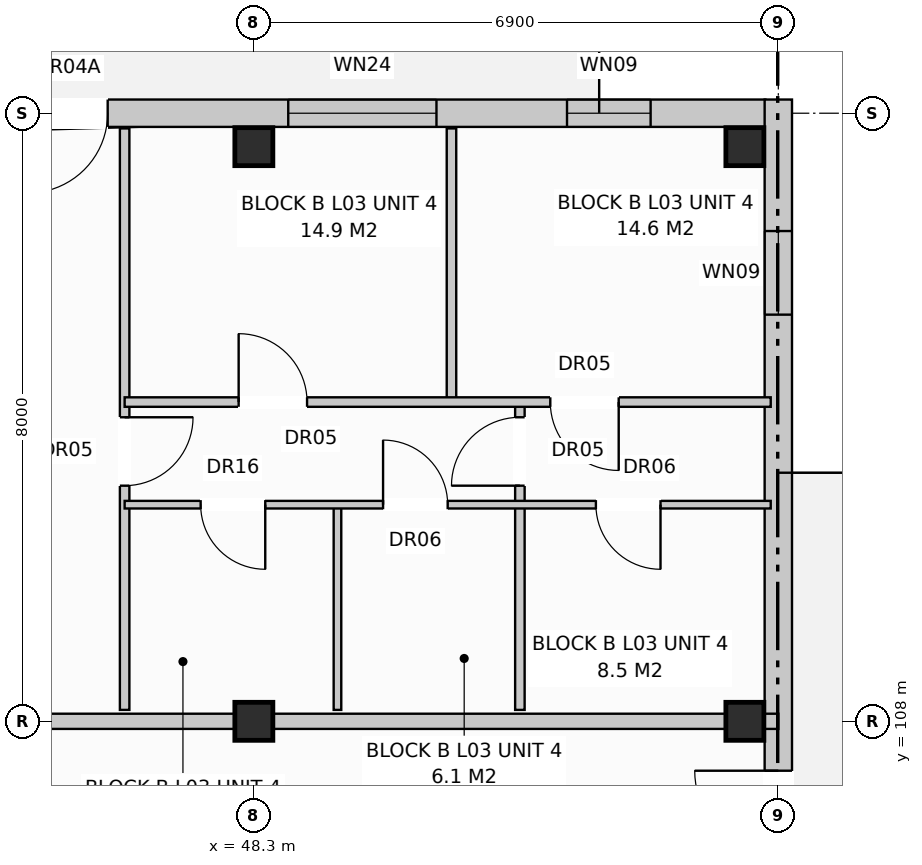
"""IFC4 building model, lengths in metres.
Left out: names, types, materials, properties, quantities, classifications, styles, units other than length and angle.
Written with IfcOpenShell. Run it as: python <this file> out.ifc"""

import sys

from ifc_helpers import new_model, si_unit, direction, frame, frame_2d, origin, origin_with_axes, origin_2d, place, context, subcontext, project, spatial, rectangle, extrude, element, fill, save


model = new_model("IFC4")
c1 = context("Model", 3, precision=1e-05, world=origin(), true_north=direction((0.0, 1.0)))
c2 = subcontext(c1, "Body", "Model", "MODEL_VIEW")
j1 = project(units=[si_unit("LENGTHUNIT", "METRE"), si_unit("PLANEANGLEUNIT", "RADIAN")], contexts=[c1])
p1 = place(None, origin())
s1 = spatial("IfcSite", under=j1, at=p1, CompositionType="ELEMENT")
p2 = place(p1, origin())
s2 = spatial("IfcBuilding", under=s1, at=p2, CompositionType="ELEMENT")
p3 = place(p2, frame((0.0, 0.0, 11.2)))
s3 = spatial("IfcBuildingStorey", under=s2, at=p3, CompositionType="ELEMENT", Elevation=11.2)
for number, where, z_axis, x_axis in (
    (1, (48.3, 108.0, 0.0), (0.0, 0.0, 1.0), (1.0, 0.0, 0.0)),
    (2, (48.3, 115.56, 0.0), (0.0, 0.0, 1.0), (1.0, 0.0, 0.0)),
    (3, (54.76, 108.0, 0.0), (0.0, 0.0, 1.0), (1.0, 0.0, 0.0)),
    (4, (54.76, 115.56, 0.0), (0.0, 0.0, 1.0), (1.0, 0.0, 0.0)),
):
    element("IfcColumn", number, at=place(p3, frame(where, z_axis=z_axis, x_axis=x_axis)), inside=s3, PredefinedType="COLUMN", context=c2, shape_type="SweptSolid", body=[
        extrude(rectangle(XDim=0.5, YDim=0.5, at=origin_2d()), origin(), (0.0, 0.0, 1.0), 3.2),
    ])
p4 = place(p3, frame((0.17, 116.0, 0.0), z_axis=(0.0, 0.0, 1.0), x_axis=(1.0, 0.0, 0.0)))
e5 = element("IfcWall", 5, at=p4, inside=s3, PredefinedType="STANDARD", context=c2, shape_type="SweptSolid", body=[
    extrude(rectangle(XDim=54.86, YDim=0.36, at=frame_2d((27.43, 0.0))), origin(), (0.0, 0.0, 1.0), 2.94),
])
p5 = place(p4, frame((2.777, 0.0, 0.0)))
e6 = element("IfcOpeningElement", 6, at=p5, cuts=e5, PredefinedType="OPENING", context=c2, shape_type="SweptSolid", body=[
    extrude(rectangle(XDim=1.05, YDim=2.12, at=frame_2d((0.525, 1.06))), frame((0.0, 0.192, 0.0), z_axis=(0.0, -1.0, 0.0), x_axis=(1.0, 0.0, 0.0)), (0.0, 0.0, 1.0), 0.384),
])
p6 = place(p4, frame((16.277, 0.0, 0.0)))
e7 = element("IfcOpeningElement", 7, at=p6, cuts=e5, PredefinedType="OPENING", context=c2, shape_type="SweptSolid", body=[
    extrude(rectangle(XDim=1.05, YDim=2.12, at=frame_2d((0.525, 1.06))), frame((0.0, 0.192, 0.0), z_axis=(0.0, -1.0, 0.0), x_axis=(1.0, 0.0, 0.0)), (0.0, 0.0, 1.0), 0.384),
])
p7 = place(p4, frame((30.777, 0.0, 0.0)))
e8 = element("IfcOpeningElement", 8, at=p7, cuts=e5, PredefinedType="OPENING", context=c2, shape_type="SweptSolid", body=[
    extrude(rectangle(XDim=1.05, YDim=2.12, at=frame_2d((0.525, 1.06))), frame((0.0, 0.192, 0.0), z_axis=(0.0, -1.0, 0.0), x_axis=(1.0, 0.0, 0.0)), (0.0, 0.0, 1.0), 0.384),
])
p8 = place(p4, frame((45.157, 0.0, 0.0)))
e9 = element("IfcOpeningElement", 9, at=p8, cuts=e5, PredefinedType="OPENING", context=c2, shape_type="SweptSolid", body=[
    extrude(rectangle(XDim=1.05, YDim=2.12, at=frame_2d((0.525, 1.06))), frame((0.0, 0.192, 0.0), z_axis=(0.0, -1.0, 0.0), x_axis=(1.0, 0.0, 0.0)), (0.0, 0.0, 1.0), 0.384),
])
p9 = place(p4, frame((1.05, 0.0, 0.72)))
e10 = element("IfcOpeningElement", 10, at=p9, cuts=e5, PredefinedType="OPENING", context=c2, shape_type="SweptSolid", body=[
    extrude(rectangle(XDim=1.1, YDim=1.5, at=frame_2d((0.55, 0.75))), frame((0.0, 0.192, 0.0), z_axis=(0.0, -1.0, 0.0), x_axis=(1.0, 0.0, 0.0)), (0.0, 0.0, 1.0), 0.384),
])
p10 = place(p4, frame((4.325, 0.0, 0.8)))
e11 = element("IfcOpeningElement", 11, at=p10, cuts=e5, PredefinedType="OPENING", context=c2, shape_type="SweptSolid", body=[
    extrude(rectangle(XDim=1.95, YDim=1.65, at=frame_2d((0.975, 0.825))), frame((0.0, 0.192, 0.0), z_axis=(0.0, -1.0, 0.0), x_axis=(1.0, 0.0, 0.0)), (0.0, 0.0, 1.0), 0.384),
])
p11 = place(p4, frame((10.45, 0.0, 0.72)))
e12 = element("IfcOpeningElement", 12, at=p11, cuts=e5, PredefinedType="OPENING", context=c2, shape_type="SweptSolid", body=[
    extrude(rectangle(XDim=1.1, YDim=1.5, at=frame_2d((0.55, 0.75))), frame((0.0, 0.192, 0.0), z_axis=(0.0, -1.0, 0.0), x_axis=(1.0, 0.0, 0.0)), (0.0, 0.0, 1.0), 0.384),
])
p12 = place(p4, frame((14.55, 0.0, 0.72)))
e13 = element("IfcOpeningElement", 13, at=p12, cuts=e5, PredefinedType="OPENING", context=c2, shape_type="SweptSolid", body=[
    extrude(rectangle(XDim=1.1, YDim=1.5, at=frame_2d((0.55, 0.75))), frame((0.0, 0.192, 0.0), z_axis=(0.0, -1.0, 0.0), x_axis=(1.0, 0.0, 0.0)), (0.0, 0.0, 1.0), 0.384),
])
p13 = place(p4, frame((18.025, 0.0, 0.8)))
e14 = element("IfcOpeningElement", 14, at=p13, cuts=e5, PredefinedType="OPENING", context=c2, shape_type="SweptSolid", body=[
    extrude(rectangle(XDim=1.95, YDim=1.65, at=frame_2d((0.975, 0.825))), frame((0.0, 0.192, 0.0), z_axis=(0.0, -1.0, 0.0), x_axis=(1.0, 0.0, 0.0)), (0.0, 0.0, 1.0), 0.384),
])
p14 = place(p4, frame((22.8, 0.0, 0.8)))
e15 = element("IfcOpeningElement", 15, at=p14, cuts=e5, PredefinedType="OPENING", context=c2, shape_type="SweptSolid", body=[
    extrude(rectangle(XDim=1.8, YDim=1.7, at=frame_2d((0.9, 0.85))), frame((0.0, 0.192, 0.0), z_axis=(0.0, -1.0, 0.0), x_axis=(1.0, 0.0, 0.0)), (0.0, 0.0, 1.0), 0.384),
])
p15 = place(p4, frame((28.85, 0.0, 0.72)))
e16 = element("IfcOpeningElement", 16, at=p15, cuts=e5, PredefinedType="OPENING", context=c2, shape_type="SweptSolid", body=[
    extrude(rectangle(XDim=1.1, YDim=1.5, at=frame_2d((0.55, 0.75))), frame((0.0, 0.192, 0.0), z_axis=(0.0, -1.0, 0.0), x_axis=(1.0, 0.0, 0.0)), (0.0, 0.0, 1.0), 0.384),
])
p16 = place(p4, frame((34.825, 0.0, 0.8)))
e17 = element("IfcOpeningElement", 17, at=p16, cuts=e5, PredefinedType="OPENING", context=c2, shape_type="SweptSolid", body=[
    extrude(rectangle(XDim=1.95, YDim=1.65, at=frame_2d((0.975, 0.825))), frame((0.0, 0.192, 0.0), z_axis=(0.0, -1.0, 0.0), x_axis=(1.0, 0.0, 0.0)), (0.0, 0.0, 1.0), 0.384),
])
p17 = place(p4, frame((38.65, 0.0, 0.72)))
e18 = element("IfcOpeningElement", 18, at=p17, cuts=e5, PredefinedType="OPENING", context=c2, shape_type="SweptSolid", body=[
    extrude(rectangle(XDim=1.1, YDim=1.5, at=frame_2d((0.55, 0.75))), frame((0.0, 0.192, 0.0), z_axis=(0.0, -1.0, 0.0), x_axis=(1.0, 0.0, 0.0)), (0.0, 0.0, 1.0), 0.384),
])
p18 = place(p4, frame((43.35, 0.0, 0.72)))
e19 = element("IfcOpeningElement", 19, at=p18, cuts=e5, PredefinedType="OPENING", context=c2, shape_type="SweptSolid", body=[
    extrude(rectangle(XDim=1.1, YDim=1.5, at=frame_2d((0.55, 0.75))), frame((0.0, 0.192, 0.0), z_axis=(0.0, -1.0, 0.0), x_axis=(1.0, 0.0, 0.0)), (0.0, 0.0, 1.0), 0.384),
])
p19 = place(p4, frame((48.583, 0.0, 0.8)))
e20 = element("IfcOpeningElement", 20, at=p19, cuts=e5, PredefinedType="OPENING", context=c2, shape_type="SweptSolid", body=[
    extrude(rectangle(XDim=1.95, YDim=1.65, at=frame_2d((0.975, 0.825))), frame((0.0, 0.192, 0.0), z_axis=(0.0, -1.0, 0.0), x_axis=(1.0, 0.0, 0.0)), (0.0, 0.0, 1.0), 0.384),
])
p20 = place(p4, frame((52.25, 0.0, 0.72)))
e21 = element("IfcOpeningElement", 21, at=p20, cuts=e5, PredefinedType="OPENING", context=c2, shape_type="SweptSolid", body=[
    extrude(rectangle(XDim=1.1, YDim=1.5, at=frame_2d((0.55, 0.75))), frame((0.0, 0.192, 0.0), z_axis=(0.0, -1.0, 0.0), x_axis=(1.0, 0.0, 0.0)), (0.0, 0.0, 1.0), 0.384),
])
p21 = place(p3, frame((55.2, 97.42, 0.0), z_axis=(0.0, 0.0, 1.0), x_axis=(0.0, 1.0, 0.0)))
e22 = element("IfcWall", 22, at=p21, inside=s3, PredefinedType="STANDARD", context=c2, shape_type="SweptSolid", body=[
    extrude(rectangle(XDim=18.76, YDim=0.36, at=frame_2d((9.38, 0.0))), origin(), (0.0, 0.0, 1.0), 2.94),
])
p22 = place(p21, frame((8.83, 0.0, 0.0)))
e23 = element("IfcOpeningElement", 23, at=p22, cuts=e22, PredefinedType="OPENING", context=c2, shape_type="SweptSolid", body=[
    extrude(rectangle(XDim=1.1, YDim=2.1, at=frame_2d((0.55, 1.05))), frame((0.0, 0.192, 0.0), z_axis=(0.0, -1.0, 0.0), x_axis=(1.0, 0.0, 0.0)), (0.0, 0.0, 1.0), 0.384),
])
p23 = place(p21, frame((1.73, 0.0, 0.72)))
e24 = element("IfcOpeningElement", 24, at=p23, cuts=e22, PredefinedType="OPENING", context=c2, shape_type="SweptSolid", body=[
    extrude(rectangle(XDim=1.1, YDim=1.5, at=frame_2d((0.55, 0.75))), frame((0.0, 0.192, 0.0), z_axis=(0.0, -1.0, 0.0), x_axis=(1.0, 0.0, 0.0)), (0.0, 0.0, 1.0), 0.384),
])
p24 = place(p21, frame((15.93, 0.0, 0.72)))
e25 = element("IfcOpeningElement", 25, at=p24, cuts=e22, PredefinedType="OPENING", context=c2, shape_type="SweptSolid", body=[
    extrude(rectangle(XDim=1.1, YDim=1.5, at=frame_2d((0.55, 0.75))), frame((0.0, 0.192, 0.0), z_axis=(0.0, -1.0, 0.0), x_axis=(1.0, 0.0, 0.0)), (0.0, 0.0, 1.0), 0.384),
])
p25 = place(p3, frame((41.4, 108.0, 0.0), z_axis=(0.0, 0.0, 1.0), x_axis=(1.0, 0.0, 0.0)))
e26 = element("IfcWall", 26, at=p25, inside=s3, PredefinedType="PARTITIONING", context=c2, shape_type="SweptSolid", body=[
    extrude(rectangle(XDim=13.8, YDim=0.2, at=frame_2d((6.9, 0.0))), origin(), (0.0, 0.0, 1.0), 2.38),
])
p26 = place(p25, frame((2.4, 0.0, 0.0)))
e27 = element("IfcOpeningElement", 27, at=p26, cuts=e26, PredefinedType="OPENING", context=c2, shape_type="SweptSolid", body=[
    extrude(rectangle(XDim=0.95, YDim=2.15, at=frame_2d((0.475, 1.075))), frame((0.0, 0.112, 0.0), z_axis=(0.0, -1.0, 0.0), x_axis=(1.0, 0.0, 0.0)), (0.0, 0.0, 1.0), 0.224),
])
p27 = place(p3, frame((46.6, 108.15, 0.0), z_axis=(0.0, 0.0, 1.0), x_axis=(0.0, 1.0, 0.0)))
e28 = element("IfcWall", 28, at=p27, inside=s3, PredefinedType="PARTITIONING", context=c2, shape_type="SweptSolid", body=[
    extrude(rectangle(XDim=7.65, YDim=0.125, at=frame_2d((3.825, 0.0))), origin(), (0.0, 0.0, 1.0), 2.94),
])
p28 = place(p27, frame((2.95, 0.0, 0.0)))
e29 = element("IfcOpeningElement", 29, at=p28, cuts=e28, PredefinedType="OPENING", context=c2, shape_type="SweptSolid", body=[
    extrude(rectangle(XDim=0.9, YDim=2.1, at=frame_2d((0.45, 1.05))), frame((0.0, 0.074, 0.0), z_axis=(0.0, -1.0, 0.0), x_axis=(1.0, 0.0, 0.0)), (0.0, 0.0, 1.0), 0.149),
])
p29 = place(p3, frame((49.4, 108.15, 0.0), z_axis=(0.0, 0.0, 1.0), x_axis=(0.0, 1.0, 0.0)))
e30 = element("IfcWall", 30, at=p29, inside=s3, PredefinedType="PARTITIONING", context=c2, shape_type="SweptSolid", body=[
    extrude(rectangle(XDim=2.7, YDim=0.1, at=frame_2d((1.35, 0.0))), origin(), (0.0, 0.0, 1.0), 2.94),
])
p30 = place(p3, frame((51.8, 108.15, 0.0), z_axis=(0.0, 0.0, 1.0), x_axis=(0.0, 1.0, 0.0)))
e31 = element("IfcWall", 31, at=p30, inside=s3, PredefinedType="PARTITIONING", context=c2, shape_type="SweptSolid", body=[
    extrude(rectangle(XDim=4.05, YDim=0.125, at=frame_2d((2.025, 0.0))), origin(), (0.0, 0.0, 1.0), 2.94),
])
p31 = place(p30, frame((2.95, 0.0, 0.0)))
e32 = element("IfcOpeningElement", 32, at=p31, cuts=e31, PredefinedType="OPENING", context=c2, shape_type="SweptSolid", body=[
    extrude(rectangle(XDim=0.9, YDim=2.1, at=frame_2d((0.45, 1.05))), frame((0.0, 0.074, 0.0), z_axis=(0.0, -1.0, 0.0), x_axis=(1.0, 0.0, 0.0)), (0.0, 0.0, 1.0), 0.149),
])
p32 = place(p3, frame((50.9, 112.2, 0.0), z_axis=(0.0, 0.0, 1.0), x_axis=(0.0, 1.0, 0.0)))
e33 = element("IfcWall", 33, at=p32, inside=s3, PredefinedType="PARTITIONING", context=c2, shape_type="SweptSolid", body=[
    extrude(rectangle(XDim=3.6, YDim=0.125, at=frame_2d((1.8, 0.0))), origin(), (0.0, 0.0, 1.0), 2.94),
])
p33 = place(p3, frame((46.6, 110.85, 0.0), z_axis=(0.0, 0.0, 1.0), x_axis=(1.0, 0.0, 0.0)))
e34 = element("IfcWall", 34, at=p33, inside=s3, PredefinedType="PARTITIONING", context=c2, shape_type="SweptSolid", body=[
    extrude(rectangle(XDim=8.5, YDim=0.1, at=frame_2d((4.25, 0.0))), origin(), (0.0, 0.0, 1.0), 2.94),
])
p34 = place(p33, frame((1.0, 0.0, 0.0)))
e35 = element("IfcOpeningElement", 35, at=p34, cuts=e34, PredefinedType="OPENING", context=c2, shape_type="SweptSolid", body=[
    extrude(rectangle(XDim=0.85, YDim=2.1, at=frame_2d((0.425, 1.05))), frame((0.0, 0.062, 0.0), z_axis=(0.0, -1.0, 0.0), x_axis=(1.0, 0.0, 0.0)), (0.0, 0.0, 1.0), 0.124),
])
p35 = place(p33, frame((3.4, 0.0, 0.0)))
e36 = element("IfcOpeningElement", 36, at=p35, cuts=e34, PredefinedType="OPENING", context=c2, shape_type="SweptSolid", body=[
    extrude(rectangle(XDim=0.85, YDim=2.05, at=frame_2d((0.425, 1.025))), frame((0.0, 0.062, 0.0), z_axis=(0.0, -1.0, 0.0), x_axis=(1.0, 0.0, 0.0)), (0.0, 0.0, 1.0), 0.124),
])
p36 = place(p33, frame((6.2, 0.0, 0.0)))
e37 = element("IfcOpeningElement", 37, at=p36, cuts=e34, PredefinedType="OPENING", context=c2, shape_type="SweptSolid", body=[
    extrude(rectangle(XDim=0.85, YDim=2.05, at=frame_2d((0.425, 1.025))), frame((0.0, 0.062, 0.0), z_axis=(0.0, -1.0, 0.0), x_axis=(1.0, 0.0, 0.0)), (0.0, 0.0, 1.0), 0.124),
])
p37 = place(p3, frame((46.6, 112.2, 0.0), z_axis=(0.0, 0.0, 1.0), x_axis=(1.0, 0.0, 0.0)))
e38 = element("IfcWall", 38, at=p37, inside=s3, PredefinedType="PARTITIONING", context=c2, shape_type="SweptSolid", body=[
    extrude(rectangle(XDim=8.5, YDim=0.125, at=frame_2d((4.25, 0.0))), origin(), (0.0, 0.0, 1.0), 2.94),
])
p38 = place(p37, frame((1.5, 0.0, 0.0)))
e39 = element("IfcOpeningElement", 39, at=p38, cuts=e38, PredefinedType="OPENING", context=c2, shape_type="SweptSolid", body=[
    extrude(rectangle(XDim=0.9, YDim=2.1, at=frame_2d((0.45, 1.05))), frame((0.0, 0.074, 0.0), z_axis=(0.0, -1.0, 0.0), x_axis=(1.0, 0.0, 0.0)), (0.0, 0.0, 1.0), 0.149),
])
p39 = place(p37, frame((5.6, 0.0, 0.0)))
e40 = element("IfcOpeningElement", 40, at=p39, cuts=e38, PredefinedType="OPENING", context=c2, shape_type="SweptSolid", body=[
    extrude(rectangle(XDim=0.9, YDim=2.1, at=frame_2d((0.45, 1.05))), frame((0.0, 0.074, 0.0), z_axis=(0.0, -1.0, 0.0), x_axis=(1.0, 0.0, 0.0)), (0.0, 0.0, 1.0), 0.149),
])
p40 = place(p8, frame((1.05, 0.0, 0.0), z_axis=(0.0, 0.0, 1.0), x_axis=(-1.0, 0.0, 0.0)))
e41 = element("IfcDoor", 41, at=p40, inside=s3, OperationType="SINGLE_SWING_LEFT", PredefinedType="DOOR", context=c2, shape_type="SweptSolid", body=[
    extrude(rectangle(XDim=1.05, YDim=2.12, at=frame_2d((0.525, 1.06))), frame((0.0, 0.025, 0.0), z_axis=(0.0, -1.0, 0.0), x_axis=(1.0, 0.0, 0.0)), (0.0, 0.0, 1.0), 0.05),
])
fill(e9, e41)
p41 = place(p19, origin_with_axes())
e42 = element("IfcWindow", 42, at=p41, inside=s3, PartitioningType="SINGLE_PANEL", PredefinedType="WINDOW", context=c2, shape_type="SweptSolid", body=[
    extrude(rectangle(XDim=1.95, YDim=1.65, at=frame_2d((0.975, 0.825))), frame((0.0, 0.03, 0.0), z_axis=(0.0, -1.0, 0.0), x_axis=(1.0, 0.0, 0.0)), (0.0, 0.0, 1.0), 0.06),
])
fill(e20, e42)
p42 = place(p20, origin_with_axes())
e43 = element("IfcWindow", 43, at=p42, inside=s3, PartitioningType="SINGLE_PANEL", PredefinedType="WINDOW", context=c2, shape_type="SweptSolid", body=[
    extrude(rectangle(XDim=1.1, YDim=1.5, at=frame_2d((0.55, 0.75))), frame((0.0, 0.03, 0.0), z_axis=(0.0, -1.0, 0.0), x_axis=(1.0, 0.0, 0.0)), (0.0, 0.0, 1.0), 0.06),
])
fill(e21, e43)
p43 = place(p22, origin_with_axes())
e44 = element("IfcDoor", 44, at=p43, inside=s3, OperationType="SINGLE_SWING_RIGHT", PredefinedType="DOOR", context=c2, shape_type="SweptSolid", body=[
    extrude(rectangle(XDim=1.1, YDim=2.1, at=frame_2d((0.55, 1.05))), frame((0.0, 0.025, 0.0), z_axis=(0.0, -1.0, 0.0), x_axis=(1.0, 0.0, 0.0)), (0.0, 0.0, 1.0), 0.05),
])
fill(e23, e44)
p44 = place(p24, origin_with_axes())
e45 = element("IfcWindow", 45, at=p44, inside=s3, PartitioningType="SINGLE_PANEL", PredefinedType="WINDOW", context=c2, shape_type="SweptSolid", body=[
    extrude(rectangle(XDim=1.1, YDim=1.5, at=frame_2d((0.55, 0.75))), frame((0.0, 0.03, 0.0), z_axis=(0.0, -1.0, 0.0), x_axis=(1.0, 0.0, 0.0)), (0.0, 0.0, 1.0), 0.06),
])
fill(e25, e45)
p45 = place(p28, frame((0.9, 0.0, 0.0), z_axis=(0.0, 0.0, 1.0), x_axis=(-1.0, 0.0, 0.0)))
e46 = element("IfcDoor", 46, at=p45, inside=s3, OperationType="SINGLE_SWING_RIGHT", PredefinedType="DOOR", context=c2, shape_type="SweptSolid", body=[
    extrude(rectangle(XDim=0.9, YDim=2.1, at=frame_2d((0.45, 1.05))), frame((0.0, 0.025, 0.0), z_axis=(0.0, -1.0, 0.0), x_axis=(1.0, 0.0, 0.0)), (0.0, 0.0, 1.0), 0.05),
])
fill(e29, e46)
p46 = place(p31, origin_with_axes())
e47 = element("IfcDoor", 47, at=p46, inside=s3, OperationType="SINGLE_SWING_LEFT", PredefinedType="DOOR", context=c2, shape_type="SweptSolid", body=[
    extrude(rectangle(XDim=0.9, YDim=2.1, at=frame_2d((0.45, 1.05))), frame((0.0, 0.025, 0.0), z_axis=(0.0, -1.0, 0.0), x_axis=(1.0, 0.0, 0.0)), (0.0, 0.0, 1.0), 0.05),
])
fill(e32, e47)
p47 = place(p34, frame((0.85, 0.0, 0.0), z_axis=(0.0, 0.0, 1.0), x_axis=(-1.0, 0.0, 0.0)))
e48 = element("IfcDoor", 48, at=p47, inside=s3, OperationType="SINGLE_SWING_RIGHT", PredefinedType="DOOR", context=c2, shape_type="SweptSolid", body=[
    extrude(rectangle(XDim=0.85, YDim=2.1, at=frame_2d((0.425, 1.05))), frame((0.0, 0.025, 0.0), z_axis=(0.0, -1.0, 0.0), x_axis=(1.0, 0.0, 0.0)), (0.0, 0.0, 1.0), 0.05),
])
fill(e35, e48)
p48 = place(p35, origin_with_axes())
e49 = element("IfcDoor", 49, at=p48, inside=s3, OperationType="SINGLE_SWING_LEFT", PredefinedType="DOOR", context=c2, shape_type="SweptSolid", body=[
    extrude(rectangle(XDim=0.85, YDim=2.05, at=frame_2d((0.425, 1.025))), frame((0.0, 0.025, 0.0), z_axis=(0.0, -1.0, 0.0), x_axis=(1.0, 0.0, 0.0)), (0.0, 0.0, 1.0), 0.05),
])
fill(e36, e49)
p49 = place(p36, frame((0.85, 0.0, 0.0), z_axis=(0.0, 0.0, 1.0), x_axis=(-1.0, 0.0, 0.0)))
e50 = element("IfcDoor", 50, at=p49, inside=s3, OperationType="SINGLE_SWING_RIGHT", PredefinedType="DOOR", context=c2, shape_type="SweptSolid", body=[
    extrude(rectangle(XDim=0.85, YDim=2.05, at=frame_2d((0.425, 1.025))), frame((0.0, 0.025, 0.0), z_axis=(0.0, -1.0, 0.0), x_axis=(1.0, 0.0, 0.0)), (0.0, 0.0, 1.0), 0.05),
])
fill(e37, e50)
p50 = place(p38, origin_with_axes())
e51 = element("IfcDoor", 51, at=p50, inside=s3, OperationType="SINGLE_SWING_LEFT", PredefinedType="DOOR", context=c2, shape_type="SweptSolid", body=[
    extrude(rectangle(XDim=0.9, YDim=2.1, at=frame_2d((0.45, 1.05))), frame((0.0, 0.025, 0.0), z_axis=(0.0, -1.0, 0.0), x_axis=(1.0, 0.0, 0.0)), (0.0, 0.0, 1.0), 0.05),
])
fill(e39, e51)
p51 = place(p39, frame((0.9, 0.0, 0.0), z_axis=(0.0, 0.0, 1.0), x_axis=(-1.0, 0.0, 0.0)))
e52 = element("IfcDoor", 52, at=p51, inside=s3, OperationType="SINGLE_SWING_RIGHT", PredefinedType="DOOR", context=c2, shape_type="SweptSolid", body=[
    extrude(rectangle(XDim=0.9, YDim=2.1, at=frame_2d((0.45, 1.05))), frame((0.0, 0.025, 0.0), z_axis=(0.0, -1.0, 0.0), x_axis=(1.0, 0.0, 0.0)), (0.0, 0.0, 1.0), 0.05),
])
fill(e40, e52)
save(model, sys.argv[1])
